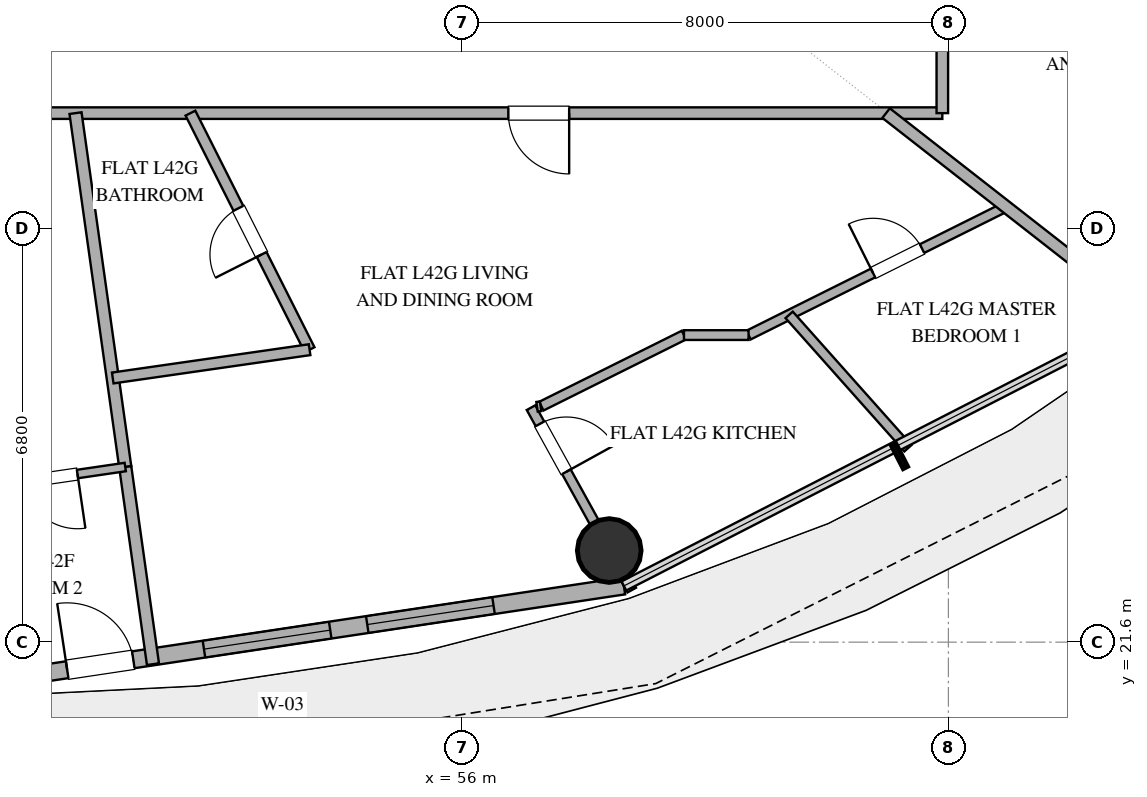
"""IFC4 building model, lengths in metres.
Left out: names, types, materials, properties, quantities, classifications, styles, units other than length and angle.
Written with IfcOpenShell. Run it as: python <this file> out.ifc"""

import sys

from ifc_helpers import new_model, si_unit, direction, frame, frame_2d, origin, origin_2d, place, context, subcontext, project, spatial, rectangle, hollow_circle, extrude, element, fill, save


model = new_model("IFC4")
c1 = context("Model", 3, precision=1e-05, world=origin(), true_north=direction((0.0, 1.0)))
c2 = subcontext(c1, "Body", "Model", "MODEL_VIEW")
j1 = project(units=[si_unit("LENGTHUNIT", "METRE"), si_unit("PLANEANGLEUNIT", "RADIAN")], contexts=[c1])
p1 = place(None, origin())
s1 = spatial("IfcSite", under=j1, at=p1, CompositionType="ELEMENT")
p2 = place(p1, origin())
s2 = spatial("IfcBuilding", under=s1, at=p2, CompositionType="ELEMENT")
p3 = place(p2, frame((0.0, 0.0, 168.6)))
s3 = spatial("IfcBuildingStorey", under=s2, at=p3, CompositionType="ELEMENT", Elevation=168.6)
p4 = place(p3, frame((58.422, 23.107, 0.0), z_axis=(0.0, 0.0, 1.0), x_axis=(1.0, 0.0, 0.0)))
e1 = element("IfcColumn", 1, at=p4, inside=s3, PredefinedType="COLUMN", context=c2, shape_type="SweptSolid", body=[
    extrude(hollow_circle(Radius=0.525, WallThickness=0.028, at=origin_2d()), origin(), (0.0, 0.0, 1.0), 3.38),
])
p5 = place(p3, frame((48.0, 20.92, 0.0), z_axis=(0.0, 0.0, 1.0), x_axis=(0.988863993413, 0.148822049884, 0.0)))
e2 = element("IfcWall", 2, at=p5, inside=s3, PredefinedType="SOLIDWALL", context=c2, shape_type="SweptSolid", body=[
    extrude(rectangle(XDim=10.783, YDim=0.28, at=frame_2d((5.392, 0.0))), origin(), (0.0, 0.0, 1.0), 3.38),
])
p6 = place(p5, frame((1.524, 0.0, 0.0)))
e3 = element("IfcOpeningElement", 3, at=p6, cuts=e2, PredefinedType="OPENING", context=c2, shape_type="SweptSolid", body=[
    extrude(rectangle(XDim=1.1, YDim=2.25, at=frame_2d((0.55, 1.125))), frame((0.0, 0.15, 0.0), z_axis=(0.0, -1.0, 0.0), x_axis=(1.0, 0.0, 0.0)), (0.0, 0.0, 1.0), 0.3),
])
p7 = place(p5, frame((3.799, 0.0, 0.85)))
e4 = element("IfcOpeningElement", 4, at=p7, cuts=e2, PredefinedType="OPENING", context=c2, shape_type="SweptSolid", body=[
    extrude(rectangle(XDim=2.1, YDim=2.2, at=frame_2d((1.05, 1.1))), frame((0.0, 0.15, 0.0), z_axis=(0.0, -1.0, 0.0), x_axis=(1.0, 0.0, 0.0)), (0.0, 0.0, 1.0), 0.3),
])
p8 = place(p5, frame((6.515, 0.0, 0.85)))
e5 = element("IfcOpeningElement", 5, at=p8, cuts=e2, PredefinedType="OPENING", context=c2, shape_type="SweptSolid", body=[
    extrude(rectangle(XDim=2.1, YDim=2.2, at=frame_2d((1.05, 1.1))), frame((0.0, 0.15, 0.0), z_axis=(0.0, -1.0, 0.0), x_axis=(1.0, 0.0, 0.0)), (0.0, 0.0, 1.0), 0.3),
])
p9 = place(p3, frame((63.9, 30.3, 0.0), z_axis=(0.0, 0.0, 1.0), x_axis=(-1.0, 0.0, 0.0)))
e6 = element("IfcWall", 6, at=p9, inside=s3, PredefinedType="PARTITIONING", context=c2, shape_type="SweptSolid", body=[
    extrude(rectangle(XDim=15.625, YDim=0.19, at=frame_2d((7.813, 0.0))), origin(), (0.0, 0.0, 1.0), 2.74),
])
p10 = place(p9, frame((6.137, 0.0, 0.0)))
e7 = element("IfcOpeningElement", 7, at=p10, cuts=e6, PredefinedType="OPENING", context=c2, shape_type="SweptSolid", body=[
    extrude(rectangle(XDim=1.0, YDim=2.2, at=frame_2d((0.5, 1.1))), frame((0.0, 0.105, 0.0), z_axis=(0.0, -1.0, 0.0), x_axis=(1.0, 0.0, 0.0)), (0.0, 0.0, 1.0), 0.21),
])
p11 = place(p3, frame((63.9, 40.49, 0.0), z_axis=(0.0, 0.0, 1.0), x_axis=(0.0, -1.0, 0.0)))
e8 = element("IfcWall", 8, at=p11, inside=s3, PredefinedType="PARTITIONING", context=c2, shape_type="SweptSolid", body=[
    extrude(rectangle(XDim=10.19, YDim=0.19, at=frame_2d((5.095, 0.0))), origin(), (0.0, 0.0, 1.0), 2.74),
])
p12 = place(p11, frame((5.659, 0.0, 0.0)))
e9 = element("IfcOpeningElement", 9, at=p12, cuts=e8, PredefinedType="OPENING", context=c2, shape_type="SweptSolid", body=[
    extrude(rectangle(XDim=1.0, YDim=2.2, at=frame_2d((0.5, 1.1))), frame((0.0, 0.105, 0.0), z_axis=(0.0, -1.0, 0.0), x_axis=(1.0, 0.0, 0.0)), (0.0, 0.0, 1.0), 0.21),
])
p13 = place(p3, frame((49.644, 30.3, 0.0), z_axis=(0.0, 0.0, 1.0), x_axis=(0.139158723068, -0.990270089316, 0.0)))
e10 = element("IfcWall", 10, at=p13, inside=s3, PredefinedType="PARTITIONING", context=c2, shape_type="SweptSolid", body=[
    extrude(rectangle(XDim=5.877, YDim=0.2, at=frame_2d((2.938, 0.0))), origin(), (0.0, 0.0, 1.0), 2.74),
])
p14 = place(p3, frame((53.494, 26.41, 0.0), z_axis=(0.0, 0.0, 1.0), x_axis=(-0.449879384809, 0.89308932315, 0.0)))
e11 = element("IfcWall", 11, at=p14, inside=s3, PredefinedType="PLUMBINGWALL", context=c2, shape_type="SweptSolid", body=[
    extrude(rectangle(XDim=4.356, YDim=0.18, at=frame_2d((2.178, 0.0))), origin(), (0.0, 0.0, 1.0), 2.74),
])
p15 = place(p14, frame((1.753, 0.0, 0.0)))
e12 = element("IfcOpeningElement", 12, at=p15, cuts=e11, PredefinedType="OPENING", context=c2, shape_type="SweptSolid", body=[
    extrude(rectangle(XDim=0.85, YDim=2.1, at=frame_2d((0.425, 1.05))), frame((0.0, 0.1, 0.0), z_axis=(0.0, -1.0, 0.0), x_axis=(1.0, 0.0, 0.0)), (0.0, 0.0, 1.0), 0.2),
])
p16 = place(p3, frame((60.713, 26.65, 0.0), z_axis=(0.0, 0.0, 1.0), x_axis=(0.894932492822, 0.446201561283, 0.0)))
e13 = element("IfcWall", 13, at=p16, inside=s3, PredefinedType="PLUMBINGWALL", context=c2, shape_type="SweptSolid", body=[
    extrude(rectangle(XDim=4.729, YDim=0.16, at=frame_2d((2.365, 0.0))), origin(), (0.0, 0.0, 1.0), 2.74),
])
p17 = place(p16, frame((2.288, 0.0, 0.0)))
e14 = element("IfcOpeningElement", 14, at=p17, cuts=e13, PredefinedType="OPENING", context=c2, shape_type="SweptSolid", body=[
    extrude(rectangle(XDim=0.9, YDim=2.1, at=frame_2d((0.45, 1.05))), frame((0.0, 0.09, 0.0), z_axis=(0.0, -1.0, 0.0), x_axis=(1.0, 0.0, 0.0)), (0.0, 0.0, 1.0), 0.18),
])
p18 = place(p3, frame((57.135, 25.456, 0.0), z_axis=(0.0, 0.0, 1.0), x_axis=(0.483427589536, -0.875384353113, 0.0)))
e15 = element("IfcWall", 15, at=p18, inside=s3, PredefinedType="PLUMBINGWALL", context=c2, shape_type="SweptSolid", body=[
    extrude(rectangle(XDim=3.427, YDim=0.16, at=frame_2d((1.713, 0.0))), origin(), (0.0, 0.0, 1.0), 2.74),
])
p19 = place(p18, frame((0.303, 0.0, 0.0)))
e16 = element("IfcOpeningElement", 16, at=p19, cuts=e15, PredefinedType="OPENING", context=c2, shape_type="SweptSolid", body=[
    extrude(rectangle(XDim=0.9, YDim=2.1, at=frame_2d((0.45, 1.05))), frame((0.0, 0.09, 0.0), z_axis=(0.0, -1.0, 0.0), x_axis=(1.0, 0.0, 0.0)), (0.0, 0.0, 1.0), 0.18),
])
p20 = place(p3, frame((50.462, 24.48, 0.0), z_axis=(0.0, 0.0, 1.0), x_axis=(0.139145146576, -0.990271997072, 0.0)))
e17 = element("IfcWall", 17, at=p20, inside=s3, PredefinedType="PARTITIONING", context=c2, shape_type="SweptSolid", body=[
    extrude(rectangle(XDim=3.274, YDim=0.2, at=frame_2d((1.637, 0.0))), origin(), (0.0, 0.0, 1.0), 2.74),
])
p21 = place(p3, frame((50.257, 25.944, 0.0), z_axis=(0.0, 0.0, 1.0), x_axis=(0.989826700743, 0.142278257286, 0.0)))
e18 = element("IfcWall", 18, at=p21, inside=s3, PredefinedType="PLUMBINGWALL", context=c2, shape_type="SweptSolid", body=[
    extrude(rectangle(XDim=3.271, YDim=0.18, at=frame_2d((1.635, 0.0))), origin(), (0.0, 0.0, 1.0), 2.74),
])
p22 = place(p3, frame((67.37, 26.866, 0.0), z_axis=(0.0, 0.0, 1.0), x_axis=(-0.788004464355, 0.615669525117, 0.0)))
e19 = element("IfcWall", 19, at=p22, inside=s3, PredefinedType="PARTITIONING", context=c2, shape_type="SweptSolid", body=[
    extrude(rectangle(XDim=5.577, YDim=0.2, at=frame_2d((2.789, 0.0))), origin(), (0.0, 0.0, 1.0), 2.74),
])
p23 = place(p3, frame((63.335, 24.79, 0.0), z_axis=(0.0, 0.0, 1.0), x_axis=(-0.665255741341, 0.746615562799, 0.0)))
e20 = element("IfcWall", 20, at=p23, inside=s3, PredefinedType="PLUMBINGWALL", context=c2, shape_type="SweptSolid", body=[
    extrude(rectangle(XDim=2.938, YDim=0.16, at=frame_2d((1.469, 0.0))), origin(), (0.0, 0.0, 1.0), 2.74),
])
p24 = place(p3, frame((59.651, 26.65, 0.0), z_axis=(0.0, 0.0, 1.0), x_axis=(-0.895041110332, -0.445983644112, 0.0)))
e21 = element("IfcWall", 21, at=p24, inside=s3, PredefinedType="PLUMBINGWALL", context=c2, shape_type="SweptSolid", body=[
    extrude(rectangle(XDim=2.621, YDim=0.16, at=frame_2d((1.311, 0.0))), origin(), (0.0, 0.0, 1.0), 2.74),
])
p25 = place(p3, frame((50.462, 24.48, 0.0), z_axis=(0.0, 0.0, 1.0), x_axis=(-0.989489157172, -0.144607080872, 0.0)))
e22 = element("IfcWall", 22, at=p25, inside=s3, PredefinedType="PARTITIONING", context=c2, shape_type="SweptSolid", body=[
    extrude(rectangle(XDim=2.489, YDim=0.14, at=frame_2d((1.244, 0.0))), origin(), (0.0, 0.0, 1.0), 2.74),
])
p26 = place(p25, frame((0.794, 0.0, 0.0)))
e23 = element("IfcOpeningElement", 23, at=p26, cuts=e22, PredefinedType="OPENING", context=c2, shape_type="SweptSolid", body=[
    extrude(rectangle(XDim=0.9, YDim=2.1, at=frame_2d((0.45, 1.05))), frame((0.0, 0.08, 0.0), z_axis=(0.0, -1.0, 0.0), x_axis=(1.0, 0.0, 0.0)), (0.0, 0.0, 1.0), 0.16),
])
p27 = place(p3, frame((60.713, 26.65, 0.0), z_axis=(0.0, 0.0, 1.0), x_axis=(-1.0, 0.0, 0.0)))
e24 = element("IfcWall", 24, at=p27, inside=s3, PredefinedType="PLUMBINGWALL", context=c2, shape_type="SweptSolid", body=[
    extrude(rectangle(XDim=1.062, YDim=0.16, at=frame_2d((0.531, 0.0))), origin(), (0.0, 0.0, 1.0), 2.74),
])
p28 = place(p3, frame((57.293, 25.479, 0.0), z_axis=(0.0, 0.0, 1.0), x_axis=(-0.989532981063, -0.144306893072, 0.0)))
e25 = element("IfcWall", 25, at=p28, inside=s3, PredefinedType="PLUMBINGWALL", context=c2, shape_type="SweptSolid", body=[
    extrude(rectangle(XDim=0.059, YDim=0.16, at=frame_2d((0.03, 0.0))), origin(), (0.0, 0.0, 1.0), 2.74),
])
p29 = place(p6, origin())
e26 = element("IfcDoor", 26, at=p29, inside=s3, OperationType="SINGLE_SWING_LEFT", PredefinedType="DOOR", context=c2, shape_type="SweptSolid", body=[
    extrude(rectangle(XDim=1.1, YDim=2.25, at=frame_2d((0.55, 1.125))), frame((0.0, 0.025, 0.0), z_axis=(0.0, -1.0, 0.0), x_axis=(1.0, 0.0, 0.0)), (0.0, 0.0, 1.0), 0.05),
])
fill(e3, e26)
p30 = place(p7, origin())
e27 = element("IfcWindow", 27, at=p30, inside=s3, PartitioningType="SINGLE_PANEL", PredefinedType="WINDOW", context=c2, shape_type="SweptSolid", body=[
    extrude(rectangle(XDim=2.1, YDim=2.2, at=frame_2d((1.05, 1.1))), frame((0.0, 0.03, 0.0), z_axis=(0.0, -1.0, 0.0), x_axis=(1.0, 0.0, 0.0)), (0.0, 0.0, 1.0), 0.06),
])
fill(e4, e27)
p31 = place(p8, origin())
e28 = element("IfcWindow", 28, at=p31, inside=s3, PartitioningType="SINGLE_PANEL", PredefinedType="WINDOW", context=c2, shape_type="SweptSolid", body=[
    extrude(rectangle(XDim=2.1, YDim=2.2, at=frame_2d((1.05, 1.1))), frame((0.0, 0.03, 0.0), z_axis=(0.0, -1.0, 0.0), x_axis=(1.0, 0.0, 0.0)), (0.0, 0.0, 1.0), 0.06),
])
fill(e5, e28)
p32 = place(p10, origin())
e29 = element("IfcDoor", 29, at=p32, inside=s3, OperationType="SINGLE_SWING_LEFT", PredefinedType="DOOR", context=c2, shape_type="SweptSolid", body=[
    extrude(rectangle(XDim=1.0, YDim=2.2, at=frame_2d((0.5, 1.1))), frame((0.0, 0.025, 0.0), z_axis=(0.0, -1.0, 0.0), x_axis=(1.0, 0.0, 0.0)), (0.0, 0.0, 1.0), 0.05),
])
fill(e7, e29)
p33 = place(p15, origin())
e30 = element("IfcDoor", 30, at=p33, inside=s3, OperationType="SINGLE_SWING_LEFT", PredefinedType="DOOR", context=c2, shape_type="SweptSolid", body=[
    extrude(rectangle(XDim=0.85, YDim=2.1, at=frame_2d((0.425, 1.05))), frame((0.0, 0.025, 0.0), z_axis=(0.0, -1.0, 0.0), x_axis=(1.0, 0.0, 0.0)), (0.0, 0.0, 1.0), 0.05),
])
fill(e12, e30)
p34 = place(p17, origin())
e31 = element("IfcDoor", 31, at=p34, inside=s3, OperationType="SINGLE_SWING_LEFT", PredefinedType="DOOR", context=c2, shape_type="SweptSolid", body=[
    extrude(rectangle(XDim=0.9, YDim=2.1, at=frame_2d((0.45, 1.05))), frame((0.0, 0.025, 0.0), z_axis=(0.0, -1.0, 0.0), x_axis=(1.0, 0.0, 0.0)), (0.0, 0.0, 1.0), 0.05),
])
fill(e14, e31)
p35 = place(p19, origin())
e32 = element("IfcDoor", 32, at=p35, inside=s3, OperationType="SINGLE_SWING_RIGHT", PredefinedType="DOOR", context=c2, shape_type="SweptSolid", body=[
    extrude(rectangle(XDim=0.9, YDim=2.1, at=frame_2d((0.45, 1.05))), frame((0.0, 0.025, 0.0), z_axis=(0.0, -1.0, 0.0), x_axis=(1.0, 0.0, 0.0)), (0.0, 0.0, 1.0), 0.05),
])
fill(e16, e32)
p36 = place(p26, origin())
e33 = element("IfcDoor", 33, at=p36, inside=s3, OperationType="SINGLE_SWING_LEFT", PredefinedType="DOOR", context=c2, shape_type="SweptSolid", body=[
    extrude(rectangle(XDim=0.9, YDim=2.1, at=frame_2d((0.45, 1.05))), frame((0.0, 0.025, 0.0), z_axis=(0.0, -1.0, 0.0), x_axis=(1.0, 0.0, 0.0)), (0.0, 0.0, 1.0), 0.05),
])
fill(e23, e33)
save(model, sys.argv[1])
